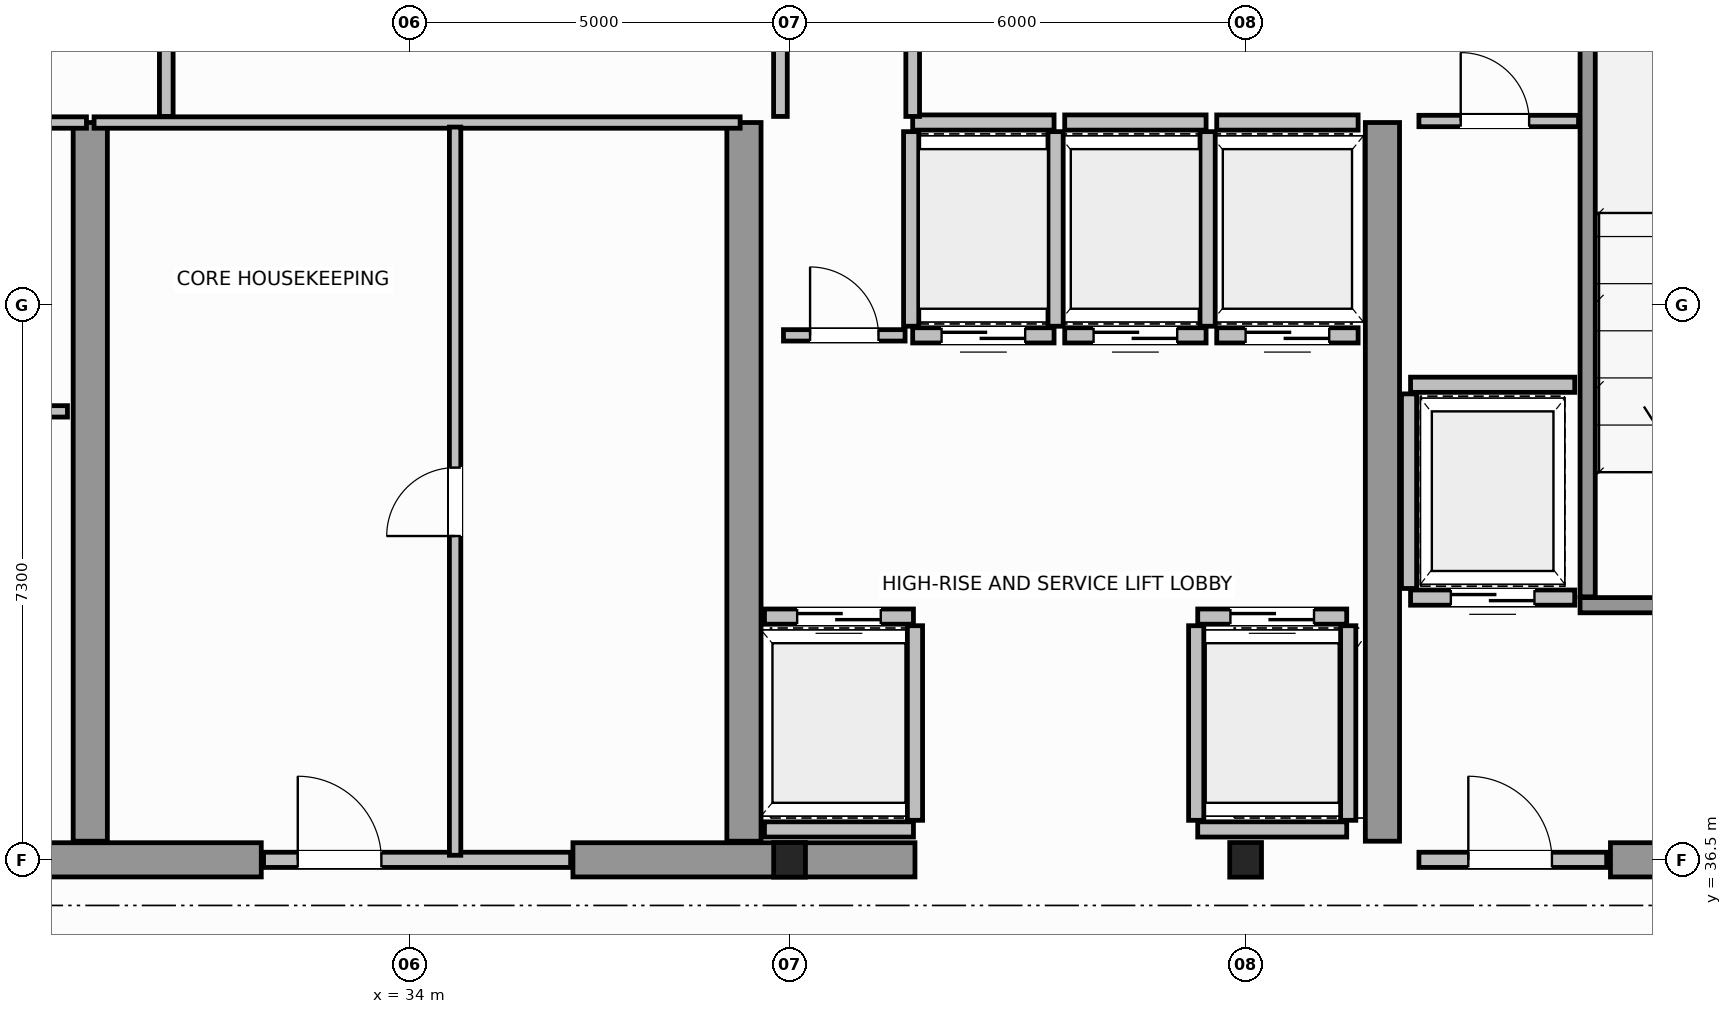
"""IFC4 building model, lengths in metres.
Left out: names, types, materials, properties, quantities, classifications, styles, units other than length and angle.
Written with IfcOpenShell. Run it as: python <this file> out.ifc"""

import sys

from ifc_helpers import new_model, si_unit, direction, frame, frame_2d, origin, origin_2d, place, context, subcontext, project, spatial, rectangle, i_section, extrude, source, transform, mapped, element, fill, save


model = new_model("IFC4")
c1 = context("Model", 3, precision=1e-05, world=origin(), true_north=direction((0.0, 1.0)))
c2 = subcontext(c1, "Body", "Model", "MODEL_VIEW")
j1 = project(units=[si_unit("LENGTHUNIT", "METRE"), si_unit("PLANEANGLEUNIT", "RADIAN")], contexts=[c1])
p1 = place(None, origin())
s1 = spatial("IfcSite", under=j1, at=p1, CompositionType="ELEMENT")
p2 = place(p1, origin())
s2 = spatial("IfcBuilding", under=s1, at=p2, CompositionType="ELEMENT")
p3 = place(p2, frame((0.0, 0.0, 261.2)))
s3 = spatial("IfcBuildingStorey", under=s2, at=p3, CompositionType="ELEMENT", Elevation=261.2)
m1 = source(origin(), c2, "Body", "SweptSolid", [
    extrude(i_section(OverallWidth=0.418, OverallDepth=0.455, WebThickness=0.042, FlangeThickness=0.058, FilletRadius=0.015, at=origin_2d()), origin(), (0.0, 0.0, 1.0), 3.8),
])
for number, where, z_axis, x_axis in (
    (1, (39.0, 36.5, 0.0), (0.0, 0.0, 1.0), (1.0, 0.0, 0.0)),
    (2, (45.0, 36.5, 0.0), (0.0, 0.0, 1.0), (1.0, 0.0, 0.0)),
):
    element("IfcColumn", number, at=place(p3, frame(where, z_axis=z_axis, x_axis=x_axis)), inside=s3, PredefinedType="COLUMN", context=c2, shape_type="MappedRepresentation", body=[
        mapped(m1, transform((0.0, 0.0, 0.0), scale=1.0)),
    ])
for number, where, z_axis, x_axis in (
    (3, (27.55, 36.5, 0.0), (0.0, 0.0, 1.0), (1.0, 0.0, 0.0)),
    (4, (36.15, 36.5, 0.0), (0.0, 0.0, 1.0), (1.0, 0.0, 0.0)),
):
    element("IfcWall", number, at=place(p3, frame(where, z_axis=z_axis, x_axis=x_axis)), inside=s3, PredefinedType="SHEAR", context=c2, shape_type="SweptSolid", body=[
        extrude(rectangle(XDim=4.5, YDim=0.45, at=frame_2d((2.25, 0.0))), origin(), (0.0, 0.0, 1.0), 3.8),
    ])
p4 = place(p3, frame((49.8, 36.5, 0.0), z_axis=(0.0, 0.0, 1.0), x_axis=(1.0, 0.0, 0.0)))
e5 = element("IfcWall", 5, at=p4, inside=s3, PredefinedType="SHEAR", context=c2, shape_type="SweptSolid", body=[
    extrude(rectangle(XDim=3.955, YDim=0.45, at=frame_2d((1.978, 0.0))), origin(), (0.0, 0.0, 1.0), 2.58),
])
for number, where, z_axis, x_axis in (
    (6, (29.8, 36.745, 0.0), (0.0, 0.0, 1.0), (0.0, 1.0, 0.0)),
    (7, (38.4, 36.745, 0.0), (0.0, 0.0, 1.0), (0.0, 1.0, 0.0)),
    (8, (46.8, 36.745, 0.0), (0.0, 0.0, 1.0), (0.0, 1.0, 0.0)),
):
    element("IfcWall", number, at=place(p3, frame(where, z_axis=z_axis, x_axis=x_axis)), inside=s3, PredefinedType="SHEAR", context=c2, shape_type="SweptSolid", body=[
        extrude(rectangle(XDim=9.455, YDim=0.45, at=frame_2d((4.728, 0.0))), origin(), (0.0, 0.0, 1.0), 3.8),
    ])
p5 = place(p3, frame((49.4, 39.85, 0.0), z_axis=(0.0, 0.0, 1.0), x_axis=(1.0, 0.0, 0.0)))
e9 = element("IfcWall", 9, at=p5, inside=s3, PredefinedType="SOLIDWALL", context=c2, shape_type="SweptSolid", body=[
    extrude(rectangle(XDim=4.375, YDim=0.2, at=frame_2d((2.188, 0.0))), origin(), (0.0, 0.0, 1.0), 3.8),
])
p6 = place(p5, frame((1.325, 0.0, 0.0)))
e10 = element("IfcOpeningElement", 10, at=p6, cuts=e9, PredefinedType="OPENING", context=c2, shape_type="SweptSolid", body=[
    extrude(rectangle(XDim=1.1, YDim=2.15, at=frame_2d((0.55, 1.075))), frame((0.0, 0.11, 0.0), z_axis=(0.0, -1.0, 0.0), x_axis=(1.0, 0.0, 0.0)), (0.0, 0.0, 1.0), 0.22),
])
p7 = place(p3, frame((49.5, 39.96, 0.0), z_axis=(0.0, 0.0, 1.0), x_axis=(0.0, 1.0, 0.0)))
e11 = element("IfcWall", 11, at=p7, inside=s3, PredefinedType="SOLIDWALL", context=c2, shape_type="SweptSolid", body=[
    extrude(rectangle(XDim=9.93, YDim=0.2, at=frame_2d((4.965, 0.0))), origin(), (0.0, 0.0, 1.0), 3.8),
])
p8 = place(p3, frame((47.28, 36.5, 0.0), z_axis=(0.0, 0.0, 1.0), x_axis=(1.0, 0.0, 0.0)))
e12 = element("IfcWall", 12, at=p8, inside=s3, PredefinedType="SOLIDWALL", context=c2, shape_type="SweptSolid", body=[
    extrude(rectangle(XDim=2.47, YDim=0.2, at=frame_2d((1.235, 0.0))), origin(), (0.0, 0.0, 1.0), 2.57),
])
p9 = place(p8, frame((0.65, 0.0, 0.0)))
e13 = element("IfcOpeningElement", 13, at=p9, cuts=e12, PredefinedType="OPENING", context=c2, shape_type="SweptSolid", body=[
    extrude(rectangle(XDim=1.1, YDim=2.15, at=frame_2d((0.55, 1.075))), frame((0.0, 0.11, 0.0), z_axis=(0.0, -1.0, 0.0), x_axis=(1.0, 0.0, 0.0)), (0.0, 0.0, 1.0), 0.22),
])
p10 = place(p3, frame((38.67, 39.7, 0.0), z_axis=(0.0, 0.0, 1.0), x_axis=(1.0, 0.0, 0.0)))
e14 = element("IfcWall", 14, at=p10, inside=s3, PredefinedType="SOLIDWALL", context=c2, shape_type="SweptSolid", body=[
    extrude(rectangle(XDim=1.96, YDim=0.2, at=frame_2d((0.98, 0.0))), origin(), (0.0, 0.0, 1.0), 3.58),
])
p11 = place(p10, frame((0.43, 0.0, 0.0)))
e15 = element("IfcOpeningElement", 15, at=p11, cuts=e14, PredefinedType="OPENING", context=c2, shape_type="SweptSolid", body=[
    extrude(rectangle(XDim=1.1, YDim=2.15, at=frame_2d((0.55, 1.075))), frame((0.0, 0.11, 0.0), z_axis=(0.0, -1.0, 0.0), x_axis=(1.0, 0.0, 0.0)), (0.0, 0.0, 1.0), 0.22),
])
p12 = place(p3, frame((38.67, 36.9, 0.0), z_axis=(0.0, 0.0, 1.0), x_axis=(1.0, 0.0, 0.0)))
e16 = element("IfcWall", 16, at=p12, inside=s3, PredefinedType="SOLIDWALL", context=c2, shape_type="SweptSolid", body=[
    extrude(rectangle(XDim=1.96, YDim=0.2, at=frame_2d((0.98, 0.0))), origin(), (0.0, 0.0, 1.0), 3.58),
])
p13 = place(p3, frame((40.65, 37.02, 0.0), z_axis=(0.0, 0.0, 1.0), x_axis=(0.0, 1.0, 0.0)))
e17 = element("IfcWall", 17, at=p13, inside=s3, PredefinedType="SOLIDWALL", context=c2, shape_type="SweptSolid", body=[
    extrude(rectangle(XDim=2.56, YDim=0.2, at=frame_2d((1.28, 0.0))), origin(), (0.0, 0.0, 1.0), 3.58),
])
p14 = place(p3, frame((44.37, 39.7, 0.0), z_axis=(0.0, 0.0, 1.0), x_axis=(1.0, 0.0, 0.0)))
e18 = element("IfcWall", 18, at=p14, inside=s3, PredefinedType="SOLIDWALL", context=c2, shape_type="SweptSolid", body=[
    extrude(rectangle(XDim=1.96, YDim=0.2, at=frame_2d((0.98, 0.0))), origin(), (0.0, 0.0, 1.0), 3.58),
])
p15 = place(p14, frame((0.43, 0.0, 0.0)))
e19 = element("IfcOpeningElement", 19, at=p15, cuts=e18, PredefinedType="OPENING", context=c2, shape_type="SweptSolid", body=[
    extrude(rectangle(XDim=1.1, YDim=2.15, at=frame_2d((0.55, 1.075))), frame((0.0, 0.11, 0.0), z_axis=(0.0, -1.0, 0.0), x_axis=(1.0, 0.0, 0.0)), (0.0, 0.0, 1.0), 0.22),
])
p16 = place(p3, frame((44.37, 36.9, 0.0), z_axis=(0.0, 0.0, 1.0), x_axis=(1.0, 0.0, 0.0)))
e20 = element("IfcWall", 20, at=p16, inside=s3, PredefinedType="SOLIDWALL", context=c2, shape_type="SweptSolid", body=[
    extrude(rectangle(XDim=1.96, YDim=0.2, at=frame_2d((0.98, 0.0))), origin(), (0.0, 0.0, 1.0), 2.57),
])
for number, where, z_axis, x_axis in (
    (21, (44.35, 37.02, 0.0), (0.0, 0.0, 1.0), (0.0, 1.0, 0.0)),
    (22, (46.35, 37.02, 0.0), (0.0, 0.0, 1.0), (0.0, 1.0, 0.0)),
):
    element("IfcWall", number, at=place(p3, frame(where, z_axis=z_axis, x_axis=x_axis)), inside=s3, PredefinedType="SOLIDWALL", context=c2, shape_type="SweptSolid", body=[
        extrude(rectangle(XDim=2.56, YDim=0.2, at=frame_2d((1.28, 0.0))), origin(), (0.0, 0.0, 1.0), 3.58),
    ])
p17 = place(p3, frame((40.62, 43.4, 0.0), z_axis=(0.0, 0.0, 1.0), x_axis=(1.0, 0.0, 0.0)))
e23 = element("IfcWall", 23, at=p17, inside=s3, PredefinedType="SOLIDWALL", context=c2, shape_type="SweptSolid", body=[
    extrude(rectangle(XDim=1.86, YDim=0.2, at=frame_2d((0.93, 0.0))), origin(), (0.0, 0.0, 1.0), 3.58),
])
p18 = place(p17, frame((0.38, 0.0, 0.0)))
e24 = element("IfcOpeningElement", 24, at=p18, cuts=e23, PredefinedType="OPENING", context=c2, shape_type="SweptSolid", body=[
    extrude(rectangle(XDim=1.1, YDim=2.15, at=frame_2d((0.55, 1.075))), frame((0.0, 0.11, 0.0), z_axis=(0.0, -1.0, 0.0), x_axis=(1.0, 0.0, 0.0)), (0.0, 0.0, 1.0), 0.22),
])
p19 = place(p3, frame((40.62, 46.2, 0.0), z_axis=(0.0, 0.0, 1.0), x_axis=(1.0, 0.0, 0.0)))
e25 = element("IfcWall", 25, at=p19, inside=s3, PredefinedType="SOLIDWALL", context=c2, shape_type="SweptSolid", body=[
    extrude(rectangle(XDim=1.86, YDim=0.2, at=frame_2d((0.93, 0.0))), origin(), (0.0, 0.0, 1.0), 3.58),
])
for number, where, z_axis, x_axis in (
    (26, (40.6, 43.52, 0.0), (0.0, 0.0, 1.0), (0.0, 1.0, 0.0)),
    (27, (42.5, 43.52, 0.0), (0.0, 0.0, 1.0), (0.0, 1.0, 0.0)),
):
    element("IfcWall", number, at=place(p3, frame(where, z_axis=z_axis, x_axis=x_axis)), inside=s3, PredefinedType="SOLIDWALL", context=c2, shape_type="SweptSolid", body=[
        extrude(rectangle(XDim=2.56, YDim=0.2, at=frame_2d((1.28, 0.0))), origin(), (0.0, 0.0, 1.0), 3.58),
    ])
p20 = place(p3, frame((42.62, 43.4, 0.0), z_axis=(0.0, 0.0, 1.0), x_axis=(1.0, 0.0, 0.0)))
e28 = element("IfcWall", 28, at=p20, inside=s3, PredefinedType="SOLIDWALL", context=c2, shape_type="SweptSolid", body=[
    extrude(rectangle(XDim=1.86, YDim=0.2, at=frame_2d((0.93, 0.0))), origin(), (0.0, 0.0, 1.0), 3.58),
])
p21 = place(p20, frame((0.38, 0.0, 0.0)))
e29 = element("IfcOpeningElement", 29, at=p21, cuts=e28, PredefinedType="OPENING", context=c2, shape_type="SweptSolid", body=[
    extrude(rectangle(XDim=1.1, YDim=2.15, at=frame_2d((0.55, 1.075))), frame((0.0, 0.11, 0.0), z_axis=(0.0, -1.0, 0.0), x_axis=(1.0, 0.0, 0.0)), (0.0, 0.0, 1.0), 0.22),
])
p22 = place(p3, frame((42.62, 46.2, 0.0), z_axis=(0.0, 0.0, 1.0), x_axis=(1.0, 0.0, 0.0)))
e30 = element("IfcWall", 30, at=p22, inside=s3, PredefinedType="SOLIDWALL", context=c2, shape_type="SweptSolid", body=[
    extrude(rectangle(XDim=1.86, YDim=0.2, at=frame_2d((0.93, 0.0))), origin(), (0.0, 0.0, 1.0), 3.58),
])
p23 = place(p3, frame((44.5, 43.52, 0.0), z_axis=(0.0, 0.0, 1.0), x_axis=(0.0, 1.0, 0.0)))
e31 = element("IfcWall", 31, at=p23, inside=s3, PredefinedType="SOLIDWALL", context=c2, shape_type="SweptSolid", body=[
    extrude(rectangle(XDim=2.56, YDim=0.2, at=frame_2d((1.28, 0.0))), origin(), (0.0, 0.0, 1.0), 3.58),
])
p24 = place(p3, frame((44.62, 43.4, 0.0), z_axis=(0.0, 0.0, 1.0), x_axis=(1.0, 0.0, 0.0)))
e32 = element("IfcWall", 32, at=p24, inside=s3, PredefinedType="SOLIDWALL", context=c2, shape_type="SweptSolid", body=[
    extrude(rectangle(XDim=1.86, YDim=0.2, at=frame_2d((0.93, 0.0))), origin(), (0.0, 0.0, 1.0), 3.58),
])
p25 = place(p24, frame((0.38, 0.0, 0.0)))
e33 = element("IfcOpeningElement", 33, at=p25, cuts=e32, PredefinedType="OPENING", context=c2, shape_type="SweptSolid", body=[
    extrude(rectangle(XDim=1.1, YDim=2.15, at=frame_2d((0.55, 1.075))), frame((0.0, 0.11, 0.0), z_axis=(0.0, -1.0, 0.0), x_axis=(1.0, 0.0, 0.0)), (0.0, 0.0, 1.0), 0.22),
])
p26 = place(p3, frame((44.62, 46.2, 0.0), z_axis=(0.0, 0.0, 1.0), x_axis=(1.0, 0.0, 0.0)))
e34 = element("IfcWall", 34, at=p26, inside=s3, PredefinedType="SOLIDWALL", context=c2, shape_type="SweptSolid", body=[
    extrude(rectangle(XDim=1.86, YDim=0.2, at=frame_2d((0.93, 0.0))), origin(), (0.0, 0.0, 1.0), 3.58),
])
p27 = place(p3, frame((47.17, 39.95, 0.0), z_axis=(0.0, 0.0, 1.0), x_axis=(1.0, 0.0, 0.0)))
e35 = element("IfcWall", 35, at=p27, inside=s3, PredefinedType="SOLIDWALL", context=c2, shape_type="SweptSolid", body=[
    extrude(rectangle(XDim=2.16, YDim=0.2, at=frame_2d((1.08, 0.0))), origin(), (0.0, 0.0, 1.0), 3.58),
])
p28 = place(p27, frame((0.53, 0.0, 0.0)))
e36 = element("IfcOpeningElement", 36, at=p28, cuts=e35, PredefinedType="OPENING", context=c2, shape_type="SweptSolid", body=[
    extrude(rectangle(XDim=1.1, YDim=2.15, at=frame_2d((0.55, 1.075))), frame((0.0, 0.11, 0.0), z_axis=(0.0, -1.0, 0.0), x_axis=(1.0, 0.0, 0.0)), (0.0, 0.0, 1.0), 0.22),
])
p29 = place(p3, frame((47.17, 42.75, 0.0), z_axis=(0.0, 0.0, 1.0), x_axis=(1.0, 0.0, 0.0)))
e37 = element("IfcWall", 37, at=p29, inside=s3, PredefinedType="SOLIDWALL", context=c2, shape_type="SweptSolid", body=[
    extrude(rectangle(XDim=2.16, YDim=0.2, at=frame_2d((1.08, 0.0))), origin(), (0.0, 0.0, 1.0), 3.58),
])
p30 = place(p3, frame((47.15, 40.07, 0.0), z_axis=(0.0, 0.0, 1.0), x_axis=(0.0, 1.0, 0.0)))
e38 = element("IfcWall", 38, at=p30, inside=s3, PredefinedType="SOLIDWALL", context=c2, shape_type="SweptSolid", body=[
    extrude(rectangle(XDim=2.56, YDim=0.2, at=frame_2d((1.28, 0.0))), origin(), (0.0, 0.0, 1.0), 3.58),
])
p31 = place(p3, frame((21.25, 46.2, 0.0), z_axis=(0.0, 0.0, 1.0), x_axis=(1.0, 0.0, 0.0)))
e39 = element("IfcWall", 39, at=p31, inside=s3, PredefinedType="PARTITIONING", context=c2, shape_type="SweptSolid", body=[
    extrude(rectangle(XDim=8.5, YDim=0.15, at=frame_2d((4.25, 0.0))), origin(), (0.0, 0.0, 1.0), 3.58),
])
p32 = place(p3, frame((21.5, 42.4, 0.0), z_axis=(0.0, 0.0, 1.0), x_axis=(1.0, 0.0, 0.0)))
e40 = element("IfcWall", 40, at=p32, inside=s3, PredefinedType="PARTITIONING", context=c2, shape_type="SweptSolid", body=[
    extrude(rectangle(XDim=8.0, YDim=0.15, at=frame_2d((4.0, 0.0))), origin(), (0.0, 0.0, 1.0), 3.58),
])
p33 = place(p32, frame((3.4, 0.0, 0.0)))
e41 = element("IfcOpeningElement", 41, at=p33, cuts=e40, PredefinedType="OPENING", context=c2, shape_type="SweptSolid", body=[
    extrude(rectangle(XDim=0.9, YDim=2.1, at=frame_2d((0.45, 1.05))), frame((0.0, 0.085, 0.0), z_axis=(0.0, -1.0, 0.0), x_axis=(1.0, 0.0, 0.0)), (0.0, 0.0, 1.0), 0.17),
])
p34 = place(p3, frame((32.08, 36.5, 0.0), z_axis=(0.0, 0.0, 1.0), x_axis=(1.0, 0.0, 0.0)))
e42 = element("IfcWall", 42, at=p34, inside=s3, PredefinedType="SOLIDWALL", context=c2, shape_type="SweptSolid", body=[
    extrude(rectangle(XDim=4.04, YDim=0.2, at=frame_2d((2.02, 0.0))), origin(), (0.0, 0.0, 1.0), 3.02),
])
p35 = place(p34, frame((0.45, 0.0, 0.0)))
e43 = element("IfcOpeningElement", 43, at=p35, cuts=e42, PredefinedType="OPENING", context=c2, shape_type="SweptSolid", body=[
    extrude(rectangle(XDim=1.1, YDim=2.15, at=frame_2d((0.55, 1.075))), frame((0.0, 0.11, 0.0), z_axis=(0.0, -1.0, 0.0), x_axis=(1.0, 0.0, 0.0)), (0.0, 0.0, 1.0), 0.22),
])
p36 = place(p3, frame((29.85, 46.2, 0.0), z_axis=(0.0, 0.0, 1.0), x_axis=(1.0, 0.0, 0.0)))
e44 = element("IfcWall", 44, at=p36, inside=s3, PredefinedType="PARTITIONING", context=c2, shape_type="SweptSolid", body=[
    extrude(rectangle(XDim=8.5, YDim=0.15, at=frame_2d((4.25, 0.0))), origin(), (0.0, 0.0, 1.0), 3.58),
])
p37 = place(p3, frame((34.6, 36.56, 0.0), z_axis=(0.0, 0.0, 1.0), x_axis=(0.0, 1.0, 0.0)))
e45 = element("IfcWall", 45, at=p37, inside=s3, PredefinedType="PARTITIONING", context=c2, shape_type="SweptSolid", body=[
    extrude(rectangle(XDim=9.58, YDim=0.15, at=frame_2d((4.79, 0.0))), origin(), (0.0, 0.0, 1.0), 3.58),
])
p38 = place(p37, frame((4.2, 0.0, 0.0)))
e46 = element("IfcOpeningElement", 46, at=p38, cuts=e45, PredefinedType="OPENING", context=c2, shape_type="SweptSolid", body=[
    extrude(rectangle(XDim=0.9, YDim=2.1, at=frame_2d((0.45, 1.05))), frame((0.0, 0.085, 0.0), z_axis=(0.0, -1.0, 0.0), x_axis=(1.0, 0.0, 0.0)), (0.0, 0.0, 1.0), 0.17),
])
p39 = place(p3, frame((47.28, 46.22, 0.0), z_axis=(0.0, 0.0, 1.0), x_axis=(1.0, 0.0, 0.0)))
e47 = element("IfcWall", 47, at=p39, inside=s3, PredefinedType="PARTITIONING", context=c2, shape_type="SweptSolid", body=[
    extrude(rectangle(XDim=2.1, YDim=0.15, at=frame_2d((1.05, 0.0))), origin(), (0.0, 0.0, 1.0), 3.58),
])
p40 = place(p39, frame((0.55, 0.0, 0.0)))
e48 = element("IfcOpeningElement", 48, at=p40, cuts=e47, PredefinedType="OPENING", context=c2, shape_type="SweptSolid", body=[
    extrude(rectangle(XDim=0.9, YDim=2.1, at=frame_2d((0.45, 1.05))), frame((0.0, 0.085, 0.0), z_axis=(0.0, -1.0, 0.0), x_axis=(1.0, 0.0, 0.0)), (0.0, 0.0, 1.0), 0.17),
])
p41 = place(p3, frame((38.92, 43.4, 0.0), z_axis=(0.0, 0.0, 1.0), x_axis=(1.0, 0.0, 0.0)))
e49 = element("IfcWall", 49, at=p41, inside=s3, PredefinedType="PARTITIONING", context=c2, shape_type="SweptSolid", body=[
    extrude(rectangle(XDim=1.6, YDim=0.15, at=frame_2d((0.8, 0.0))), origin(), (0.0, 0.0, 1.0), 3.58),
])
p42 = place(p41, frame((0.35, 0.0, 0.0)))
e50 = element("IfcOpeningElement", 50, at=p42, cuts=e49, PredefinedType="OPENING", context=c2, shape_type="SweptSolid", body=[
    extrude(rectangle(XDim=0.9, YDim=2.1, at=frame_2d((0.45, 1.05))), frame((0.0, 0.085, 0.0), z_axis=(0.0, -1.0, 0.0), x_axis=(1.0, 0.0, 0.0)), (0.0, 0.0, 1.0), 0.17),
])
for number, where, z_axis, x_axis in (
    (51, (30.8, 46.28, 0.0), (0.0, 0.0, 1.0), (0.0, 1.0, 0.0)),
    (52, (38.88, 46.28, 0.0), (0.0, 0.0, 1.0), (0.0, 1.0, 0.0)),
):
    element("IfcWall", number, at=place(p3, frame(where, z_axis=z_axis, x_axis=x_axis)), inside=s3, PredefinedType="PLUMBINGWALL", context=c2, shape_type="SweptSolid", body=[
        extrude(rectangle(XDim=1.94, YDim=0.18, at=frame_2d((0.97, 0.0))), origin(), (0.0, 0.0, 1.0), 3.58),
    ])
p43 = place(p3, frame((40.62, 46.28, 0.0), z_axis=(0.0, 0.0, 1.0), x_axis=(0.0, 1.0, 0.0)))
e53 = element("IfcWall", 53, at=p43, inside=s3, PredefinedType="PLUMBINGWALL", context=c2, shape_type="SweptSolid", body=[
    extrude(rectangle(XDim=2.0, YDim=0.18, at=frame_2d((1.0, 0.0))), origin(), (0.0, 0.0, 1.0), 3.58),
])
m2 = source(origin(), c2, "Body", "SweptSolid", [
    extrude(rectangle(XDim=1.1, YDim=2.15, at=frame_2d((0.55, 1.075))), frame((0.0, 0.025, 0.0), z_axis=(0.0, -1.0, 0.0), x_axis=(1.0, 0.0, 0.0)), (0.0, 0.0, 1.0), 0.05),
])
p44 = place(p9, origin())
e54 = element("IfcDoor", 54, at=p44, inside=s3, OperationType="SINGLE_SWING_LEFT", PredefinedType="DOOR", context=c2, shape_type="MappedRepresentation", body=[
    mapped(m2, transform((0.0, 0.0, 0.0), scale=1.0)),
])
fill(e13, e54)
p45 = place(p11, origin())
e55 = element("IfcDoor", 55, at=p45, inside=s3, OperationType="DOUBLE_DOOR_SLIDING", PredefinedType="DOOR", context=c2, shape_type="MappedRepresentation", body=[
    mapped(m2, transform((0.0, 0.0, 0.0), scale=1.0)),
])
fill(e15, e55)
p46 = place(p15, origin())
e56 = element("IfcDoor", 56, at=p46, inside=s3, OperationType="DOUBLE_DOOR_SLIDING", PredefinedType="DOOR", context=c2, shape_type="MappedRepresentation", body=[
    mapped(m2, transform((0.0, 0.0, 0.0), scale=1.0)),
])
fill(e19, e56)
p47 = place(p18, origin())
e57 = element("IfcDoor", 57, at=p47, inside=s3, OperationType="DOUBLE_DOOR_SLIDING", PredefinedType="DOOR", context=c2, shape_type="MappedRepresentation", body=[
    mapped(m2, transform((0.0, 0.0, 0.0), scale=1.0)),
])
fill(e24, e57)
p48 = place(p21, origin())
e58 = element("IfcDoor", 58, at=p48, inside=s3, OperationType="DOUBLE_DOOR_SLIDING", PredefinedType="DOOR", context=c2, shape_type="MappedRepresentation", body=[
    mapped(m2, transform((0.0, 0.0, 0.0), scale=1.0)),
])
fill(e29, e58)
p49 = place(p25, origin())
e59 = element("IfcDoor", 59, at=p49, inside=s3, OperationType="DOUBLE_DOOR_SLIDING", PredefinedType="DOOR", context=c2, shape_type="MappedRepresentation", body=[
    mapped(m2, transform((0.0, 0.0, 0.0), scale=1.0)),
])
fill(e33, e59)
p50 = place(p28, origin())
e60 = element("IfcDoor", 60, at=p50, inside=s3, OperationType="DOUBLE_DOOR_SLIDING", PredefinedType="DOOR", context=c2, shape_type="MappedRepresentation", body=[
    mapped(m2, transform((0.0, 0.0, 0.0), scale=1.0)),
])
fill(e36, e60)
p51 = place(p35, origin())
e61 = element("IfcDoor", 61, at=p51, inside=s3, OperationType="SINGLE_SWING_LEFT", PredefinedType="DOOR", context=c2, shape_type="MappedRepresentation", body=[
    mapped(m2, transform((0.0, 0.0, 0.0), scale=1.0)),
])
fill(e43, e61)
m3 = source(origin(), c2, "Body", "SweptSolid", [
    extrude(rectangle(XDim=0.9, YDim=2.1, at=frame_2d((0.45, 1.05))), frame((0.0, 0.025, 0.0), z_axis=(0.0, -1.0, 0.0), x_axis=(1.0, 0.0, 0.0)), (0.0, 0.0, 1.0), 0.05),
])
p52 = place(p38, origin())
e62 = element("IfcDoor", 62, at=p52, inside=s3, OperationType="SINGLE_SWING_RIGHT", PredefinedType="DOOR", context=c2, shape_type="MappedRepresentation", body=[
    mapped(m3, transform((0.0, 0.0, 0.0), scale=1.0)),
])
fill(e46, e62)
p53 = place(p40, origin())
e63 = element("IfcDoor", 63, at=p53, inside=s3, OperationType="SINGLE_SWING_RIGHT", PredefinedType="DOOR", context=c2, shape_type="MappedRepresentation", body=[
    mapped(m3, transform((0.0, 0.0, 0.0), scale=1.0)),
])
fill(e48, e63)
p54 = place(p42, origin())
e64 = element("IfcDoor", 64, at=p54, inside=s3, OperationType="SINGLE_SWING_LEFT", PredefinedType="DOOR", context=c2, shape_type="MappedRepresentation", body=[
    mapped(m3, transform((0.0, 0.0, 0.0), scale=1.0)),
])
fill(e50, e64)
save(model, sys.argv[1])
